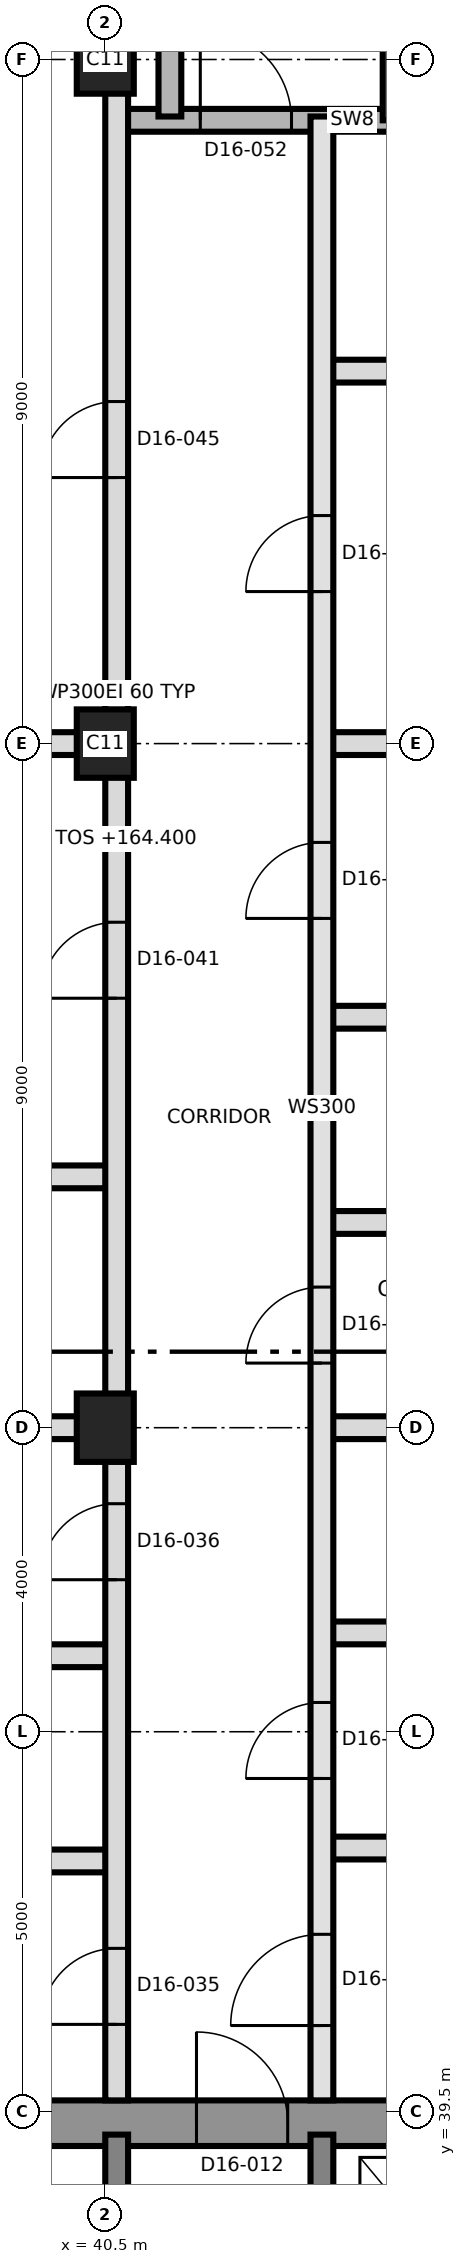
"""IFC4 building model, lengths in metres.
Left out: names, types, materials, properties, quantities, classifications, styles, units other than length and angle.
Written with IfcOpenShell. Run it as: python <this file> out.ifc"""

import sys

from ifc_helpers import new_model, si_unit, direction, frame, frame_2d, origin, origin_2d, place, context, subcontext, project, spatial, rectangle, extrude, element, fill, save


model = new_model("IFC4")
c1 = context("Model", 3, precision=1e-05, world=origin(), true_north=direction((0.0, 1.0)))
c2 = subcontext(c1, "Body", "Model", "MODEL_VIEW")
j1 = project(units=[si_unit("LENGTHUNIT", "METRE"), si_unit("PLANEANGLEUNIT", "RADIAN")], contexts=[c1])
p1 = place(None, origin())
s1 = spatial("IfcSite", under=j1, at=p1, CompositionType="ELEMENT")
p2 = place(p1, origin())
s2 = spatial("IfcBuilding", under=s1, at=p2, CompositionType="ELEMENT")
p3 = place(p2, frame((0.0, 0.0, 164.4)))
s3 = spatial("IfcBuildingStorey", under=s2, at=p3, CompositionType="ELEMENT", Elevation=164.4)
p4 = place(p3, frame((31.2, 39.35, 0.0), z_axis=(0.0, 0.0, 1.0), x_axis=(1.0, 0.0, 0.0)))
e1 = element("IfcWall", 1, at=p4, inside=s3, PredefinedType="SHEAR", context=c2, shape_type="SweptSolid", body=[
    extrude(rectangle(XDim=27.0, YDim=0.6, at=frame_2d((13.5, 0.0))), origin(), (0.0, 0.0, 1.0), 3.7),
])
p5 = place(p4, frame((10.5, 0.0, 0.0)))
e2 = element("IfcOpeningElement", 2, at=p5, cuts=e1, PredefinedType="OPENING", context=c2, shape_type="SweptSolid", body=[
    extrude(rectangle(XDim=1.2, YDim=2.1, at=frame_2d((0.6, 1.05))), frame((0.0, 0.31, 0.0), z_axis=(0.0, -1.0, 0.0), x_axis=(1.0, 0.0, 0.0)), (0.0, 0.0, 1.0), 0.62),
])
for number, where, z_axis, x_axis in (
    (3, (40.65, 33.5, 0.0), (0.0, 0.0, 1.0), (0.0, 1.0, 0.0)),
    (4, (43.35, 33.5, 0.0), (0.0, 0.0, 1.0), (0.0, 1.0, 0.0)),
):
    element("IfcWall", number, at=place(p3, frame(where, z_axis=z_axis, x_axis=x_axis)), inside=s3, PredefinedType="SHEAR", context=c2, shape_type="SweptSolid", body=[
        extrude(rectangle(XDim=5.7, YDim=0.3, at=frame_2d((2.85, 0.0))), origin(), (0.0, 0.0, 1.0), 3.7),
    ])
for number, where, z_axis, x_axis in (
    (5, (40.5, 48.5, 0.0), (0.0, 0.0, 1.0), (0.0, 1.0, 0.0)),
    (6, (40.5, 57.5, 0.0), (0.0, 0.0, 1.0), (0.0, 1.0, 0.0)),
    (7, (40.5, 66.5, 0.0), (0.0, 0.0, 1.0), (0.0, 1.0, 0.0)),
):
    element("IfcColumn", number, at=place(p3, frame(where, z_axis=z_axis, x_axis=x_axis)), inside=s3, PredefinedType="COLUMN", context=c2, shape_type="SweptSolid", body=[
        extrude(rectangle(XDim=0.9, YDim=0.75, at=origin_2d()), origin(), (0.0, 0.0, 1.0), 3.7),
    ])
p6 = place(p3, frame((37.45, 42.8, 0.0), z_axis=(0.0, 0.0, 1.0), x_axis=(1.0, 0.0, 0.0)))
e8 = element("IfcWall", 8, at=p6, inside=s3, PredefinedType="PARTITIONING", context=c2, shape_type="SweptSolid", body=[
    extrude(rectangle(XDim=3.2, YDim=0.3, at=frame_2d((1.6, 0.0))), origin(), (0.0, 0.0, 1.0), 3.4),
])
p7 = place(p3, frame((43.35, 42.97, 0.0), z_axis=(0.0, 0.0, 1.0), x_axis=(1.0, 0.0, 0.0)))
e9 = element("IfcWall", 9, at=p7, inside=s3, PredefinedType="PARTITIONING", context=c2, shape_type="SweptSolid", body=[
    extrude(rectangle(XDim=8.149, YDim=0.3, at=frame_2d((4.074, 0.0))), origin(), (0.0, 0.0, 1.0), 3.4),
])
p8 = place(p3, frame((30.565, 45.5, 0.0), z_axis=(0.0, 0.0, 1.0), x_axis=(1.0, 0.0, 0.0)))
e10 = element("IfcWall", 10, at=p8, inside=s3, PredefinedType="PARTITIONING", context=c2, shape_type="SweptSolid", body=[
    extrude(rectangle(XDim=10.085, YDim=0.3, at=frame_2d((5.042, 0.0))), origin(), (0.0, 0.0, 1.0), 3.4),
])
p9 = place(p3, frame((43.35, 45.8, 0.0), z_axis=(0.0, 0.0, 1.0), x_axis=(1.0, 0.0, 0.0)))
e11 = element("IfcWall", 11, at=p9, inside=s3, PredefinedType="PARTITIONING", context=c2, shape_type="SweptSolid", body=[
    extrude(rectangle(XDim=3.2, YDim=0.3, at=frame_2d((1.6, 0.0))), origin(), (0.0, 0.0, 1.0), 3.4),
])
p10 = place(p3, frame((30.565, 48.5, 0.0), z_axis=(0.0, 0.0, 1.0), x_axis=(1.0, 0.0, 0.0)))
e12 = element("IfcWall", 12, at=p10, inside=s3, PredefinedType="PARTITIONING", context=c2, shape_type="SweptSolid", body=[
    extrude(rectangle(XDim=10.085, YDim=0.3, at=frame_2d((5.042, 0.0))), origin(), (0.0, 0.0, 1.0), 3.4),
])
p11 = place(p3, frame((43.35, 48.5, 0.0), z_axis=(0.0, 0.0, 1.0), x_axis=(1.0, 0.0, 0.0)))
e13 = element("IfcWall", 13, at=p11, inside=s3, PredefinedType="PARTITIONING", context=c2, shape_type="SweptSolid", body=[
    extrude(rectangle(XDim=7.265, YDim=0.3, at=frame_2d((3.632, 0.0))), origin(), (0.0, 0.0, 1.0), 3.4),
])
p12 = place(p3, frame((43.35, 51.2, 0.0), z_axis=(0.0, 0.0, 1.0), x_axis=(1.0, 0.0, 0.0)))
e14 = element("IfcWall", 14, at=p12, inside=s3, PredefinedType="PARTITIONING", context=c2, shape_type="SweptSolid", body=[
    extrude(rectangle(XDim=3.2, YDim=0.3, at=frame_2d((1.6, 0.0))), origin(), (0.0, 0.0, 1.0), 3.4),
])
p13 = place(p3, frame((37.15, 51.8, 0.0), z_axis=(0.0, 0.0, 1.0), x_axis=(1.0, 0.0, 0.0)))
e15 = element("IfcWall", 15, at=p13, inside=s3, PredefinedType="PARTITIONING", context=c2, shape_type="SweptSolid", body=[
    extrude(rectangle(XDim=3.5, YDim=0.3, at=frame_2d((1.75, 0.0))), origin(), (0.0, 0.0, 1.0), 3.4),
])
p14 = place(p3, frame((43.35, 53.9, 0.0), z_axis=(0.0, 0.0, 1.0), x_axis=(1.0, 0.0, 0.0)))
e16 = element("IfcWall", 16, at=p14, inside=s3, PredefinedType="PARTITIONING", context=c2, shape_type="SweptSolid", body=[
    extrude(rectangle(XDim=7.225, YDim=0.3, at=frame_2d((3.612, 0.0))), origin(), (0.0, 0.0, 1.0), 3.4),
])
p15 = place(p3, frame((30.565, 57.5, 0.0), z_axis=(0.0, 0.0, 1.0), x_axis=(1.0, 0.0, 0.0)))
e17 = element("IfcWall", 17, at=p15, inside=s3, PredefinedType="PARTITIONING", context=c2, shape_type="SweptSolid", body=[
    extrude(rectangle(XDim=10.085, YDim=0.3, at=frame_2d((5.042, 0.0))), origin(), (0.0, 0.0, 1.0), 3.4),
])
p16 = place(p3, frame((43.35, 57.5, 0.0), z_axis=(0.0, 0.0, 1.0), x_axis=(1.0, 0.0, 0.0)))
e18 = element("IfcWall", 18, at=p16, inside=s3, PredefinedType="PARTITIONING", context=c2, shape_type="SweptSolid", body=[
    extrude(rectangle(XDim=7.265, YDim=0.3, at=frame_2d((3.632, 0.0))), origin(), (0.0, 0.0, 1.0), 3.4),
])
p17 = place(p3, frame((43.35, 62.4, 0.0), z_axis=(0.0, 0.0, 1.0), x_axis=(1.0, 0.0, 0.0)))
e19 = element("IfcWall", 19, at=p17, inside=s3, PredefinedType="PARTITIONING", context=c2, shape_type="SweptSolid", body=[
    extrude(rectangle(XDim=7.265, YDim=0.3, at=frame_2d((3.632, 0.0))), origin(), (0.0, 0.0, 1.0), 3.4),
])
p18 = place(p17, frame((4.65, 0.0, 0.0)))
e20 = element("IfcOpeningElement", 20, at=p18, cuts=e19, PredefinedType="OPENING", context=c2, shape_type="SweptSolid", body=[
    extrude(rectangle(XDim=1.0, YDim=2.1, at=frame_2d((0.5, 1.05))), frame((0.0, 0.16, 0.0), z_axis=(0.0, -1.0, 0.0), x_axis=(1.0, 0.0, 0.0)), (0.0, 0.0, 1.0), 0.32),
])
p19 = place(p3, frame((40.65, 65.7, 0.0), z_axis=(0.0, 0.0, 1.0), x_axis=(1.0, 0.0, 0.0)))
e21 = element("IfcWall", 21, at=p19, inside=s3, PredefinedType="SHEAR", context=c2, shape_type="SweptSolid", body=[
    extrude(rectangle(XDim=6.2, YDim=0.3, at=frame_2d((3.1, 0.0))), origin(), (0.0, 0.0, 1.0), 3.4),
])
p20 = place(p19, frame((1.1, 0.0, 0.0)))
e22 = element("IfcOpeningElement", 22, at=p20, cuts=e21, PredefinedType="OPENING", context=c2, shape_type="SweptSolid", body=[
    extrude(rectangle(XDim=1.2, YDim=2.1, at=frame_2d((0.6, 1.05))), frame((0.0, 0.16, 0.0), z_axis=(0.0, -1.0, 0.0), x_axis=(1.0, 0.0, 0.0)), (0.0, 0.0, 1.0), 0.32),
])
p21 = place(p3, frame((40.65, 39.65, 0.0), z_axis=(0.0, 0.0, 1.0), x_axis=(0.0, 1.0, 0.0)))
e23 = element("IfcWall", 23, at=p21, inside=s3, PredefinedType="PARTITIONING", context=c2, shape_type="SweptSolid", body=[
    extrude(rectangle(XDim=37.025, YDim=0.3, at=frame_2d((18.513, 0.0))), origin(), (0.0, 0.0, 1.0), 3.4),
])
p22 = place(p21, frame((1.0, 0.0, 0.0)))
e24 = element("IfcOpeningElement", 24, at=p22, cuts=e23, PredefinedType="OPENING", context=c2, shape_type="SweptSolid", body=[
    extrude(rectangle(XDim=1.0, YDim=2.1, at=frame_2d((0.5, 1.05))), frame((0.0, 0.16, 0.0), z_axis=(0.0, -1.0, 0.0), x_axis=(1.0, 0.0, 0.0)), (0.0, 0.0, 1.0), 0.32),
])
p23 = place(p21, frame((6.85, 0.0, 0.0)))
e25 = element("IfcOpeningElement", 25, at=p23, cuts=e23, PredefinedType="OPENING", context=c2, shape_type="SweptSolid", body=[
    extrude(rectangle(XDim=1.0, YDim=2.1, at=frame_2d((0.5, 1.05))), frame((0.0, 0.16, 0.0), z_axis=(0.0, -1.0, 0.0), x_axis=(1.0, 0.0, 0.0)), (0.0, 0.0, 1.0), 0.32),
])
p24 = place(p21, frame((14.5, 0.0, 0.0)))
e26 = element("IfcOpeningElement", 26, at=p24, cuts=e23, PredefinedType="OPENING", context=c2, shape_type="SweptSolid", body=[
    extrude(rectangle(XDim=1.0, YDim=2.4, at=frame_2d((0.5, 1.2))), frame((0.0, 0.16, 0.0), z_axis=(0.0, -1.0, 0.0), x_axis=(1.0, 0.0, 0.0)), (0.0, 0.0, 1.0), 0.32),
])
p25 = place(p21, frame((21.35, 0.0, 0.0)))
e27 = element("IfcOpeningElement", 27, at=p25, cuts=e23, PredefinedType="OPENING", context=c2, shape_type="SweptSolid", body=[
    extrude(rectangle(XDim=1.0, YDim=2.4, at=frame_2d((0.5, 1.2))), frame((0.0, 0.16, 0.0), z_axis=(0.0, -1.0, 0.0), x_axis=(1.0, 0.0, 0.0)), (0.0, 0.0, 1.0), 0.32),
])
p26 = place(p3, frame((41.35, 65.75, 0.0), z_axis=(0.0, 0.0, 1.0), x_axis=(0.0, 1.0, 0.0)))
e28 = element("IfcWall", 28, at=p26, inside=s3, PredefinedType="SHEAR", context=c2, shape_type="SweptSolid", body=[
    extrude(rectangle(XDim=8.85, YDim=0.3, at=frame_2d((4.425, 0.0))), origin(), (0.0, 0.0, 1.0), 3.4),
])
p27 = place(p3, frame((43.35, 39.65, 0.0), z_axis=(0.0, 0.0, 1.0), x_axis=(0.0, 1.0, 0.0)))
e29 = element("IfcWall", 29, at=p27, inside=s3, PredefinedType="SOLIDWALL", context=c2, shape_type="SweptSolid", body=[
    extrude(rectangle(XDim=26.1, YDim=0.3, at=frame_2d((13.05, 0.0))), origin(), (0.0, 0.0, 1.0), 3.4),
])
p28 = place(p27, frame((0.985, 0.0, 0.0)))
e30 = element("IfcOpeningElement", 30, at=p28, cuts=e29, PredefinedType="OPENING", context=c2, shape_type="SweptSolid", body=[
    extrude(rectangle(XDim=1.2, YDim=2.1, at=frame_2d((0.6, 1.05))), frame((0.0, 0.16, 0.0), z_axis=(0.0, -1.0, 0.0), x_axis=(1.0, 0.0, 0.0)), (0.0, 0.0, 1.0), 0.32),
])
p29 = place(p27, frame((4.235, 0.0, 0.0)))
e31 = element("IfcOpeningElement", 31, at=p29, cuts=e29, PredefinedType="OPENING", context=c2, shape_type="SweptSolid", body=[
    extrude(rectangle(XDim=1.0, YDim=2.1, at=frame_2d((0.5, 1.05))), frame((0.0, 0.16, 0.0), z_axis=(0.0, -1.0, 0.0), x_axis=(1.0, 0.0, 0.0)), (0.0, 0.0, 1.0), 0.32),
])
p30 = place(p27, frame((9.7, 0.0, 0.0)))
e32 = element("IfcOpeningElement", 32, at=p30, cuts=e29, PredefinedType="OPENING", context=c2, shape_type="SweptSolid", body=[
    extrude(rectangle(XDim=1.0, YDim=2.1, at=frame_2d((0.5, 1.05))), frame((0.0, 0.16, 0.0), z_axis=(0.0, -1.0, 0.0), x_axis=(1.0, 0.0, 0.0)), (0.0, 0.0, 1.0), 0.32),
])
p31 = place(p27, frame((15.55, 0.0, 0.0)))
e33 = element("IfcOpeningElement", 33, at=p31, cuts=e29, PredefinedType="OPENING", context=c2, shape_type="SweptSolid", body=[
    extrude(rectangle(XDim=1.0, YDim=2.1, at=frame_2d((0.5, 1.05))), frame((0.0, 0.16, 0.0), z_axis=(0.0, -1.0, 0.0), x_axis=(1.0, 0.0, 0.0)), (0.0, 0.0, 1.0), 0.32),
])
p32 = place(p27, frame((19.85, 0.0, 0.0)))
e34 = element("IfcOpeningElement", 34, at=p32, cuts=e29, PredefinedType="OPENING", context=c2, shape_type="SweptSolid", body=[
    extrude(rectangle(XDim=1.0, YDim=2.4, at=frame_2d((0.5, 1.2))), frame((0.0, 0.16, 0.0), z_axis=(0.0, -1.0, 0.0), x_axis=(1.0, 0.0, 0.0)), (0.0, 0.0, 1.0), 0.32),
])
p33 = place(p3, frame((44.3, 65.7, 0.0), z_axis=(0.0, 0.0, 1.0), x_axis=(0.0, 1.0, 0.0)))
e35 = element("IfcWall", 35, at=p33, inside=s3, PredefinedType="SHEAR", context=c2, shape_type="SweptSolid", body=[
    extrude(rectangle(XDim=8.9, YDim=0.3, at=frame_2d((4.45, 0.0))), origin(), (0.0, 0.0, 1.0), 3.4),
])
p34 = place(p5, origin())
e36 = element("IfcDoor", 36, at=p34, inside=s3, OperationType="SINGLE_SWING_RIGHT", PredefinedType="DOOR", context=c2, shape_type="SweptSolid", body=[
    extrude(rectangle(XDim=1.2, YDim=2.1, at=frame_2d((0.6, 1.05))), frame((0.0, 0.025, 0.0), z_axis=(0.0, -1.0, 0.0), x_axis=(1.0, 0.0, 0.0)), (0.0, 0.0, 1.0), 0.05),
])
fill(e2, e36)
p35 = place(p28, origin())
e37 = element("IfcDoor", 37, at=p35, inside=s3, OperationType="SINGLE_SWING_RIGHT", PredefinedType="DOOR", context=c2, shape_type="SweptSolid", body=[
    extrude(rectangle(XDim=1.2, YDim=2.1, at=frame_2d((0.6, 1.05))), frame((0.0, 0.025, 0.0), z_axis=(0.0, -1.0, 0.0), x_axis=(1.0, 0.0, 0.0)), (0.0, 0.0, 1.0), 0.05),
])
fill(e30, e37)
p36 = place(p29, origin())
e38 = element("IfcDoor", 38, at=p36, inside=s3, OperationType="SINGLE_SWING_LEFT", PredefinedType="DOOR", context=c2, shape_type="SweptSolid", body=[
    extrude(rectangle(XDim=1.0, YDim=2.1, at=frame_2d((0.5, 1.05))), frame((0.0, 0.025, 0.0), z_axis=(0.0, -1.0, 0.0), x_axis=(1.0, 0.0, 0.0)), (0.0, 0.0, 1.0), 0.05),
])
fill(e31, e38)
p37 = place(p22, origin())
e39 = element("IfcDoor", 39, at=p37, inside=s3, OperationType="SINGLE_SWING_RIGHT", PredefinedType="DOOR", context=c2, shape_type="SweptSolid", body=[
    extrude(rectangle(XDim=1.0, YDim=2.1, at=frame_2d((0.5, 1.05))), frame((0.0, 0.025, 0.0), z_axis=(0.0, -1.0, 0.0), x_axis=(1.0, 0.0, 0.0)), (0.0, 0.0, 1.0), 0.05),
])
fill(e24, e39)
p38 = place(p23, origin())
e40 = element("IfcDoor", 40, at=p38, inside=s3, OperationType="SINGLE_SWING_LEFT", PredefinedType="DOOR", context=c2, shape_type="SweptSolid", body=[
    extrude(rectangle(XDim=1.0, YDim=2.1, at=frame_2d((0.5, 1.05))), frame((0.0, 0.025, 0.0), z_axis=(0.0, -1.0, 0.0), x_axis=(1.0, 0.0, 0.0)), (0.0, 0.0, 1.0), 0.05),
])
fill(e25, e40)
p39 = place(p30, origin())
e41 = element("IfcDoor", 41, at=p39, inside=s3, OperationType="SINGLE_SWING_RIGHT", PredefinedType="DOOR", context=c2, shape_type="SweptSolid", body=[
    extrude(rectangle(XDim=1.0, YDim=2.1, at=frame_2d((0.5, 1.05))), frame((0.0, 0.025, 0.0), z_axis=(0.0, -1.0, 0.0), x_axis=(1.0, 0.0, 0.0)), (0.0, 0.0, 1.0), 0.05),
])
fill(e32, e41)
p40 = place(p31, origin())
e42 = element("IfcDoor", 42, at=p40, inside=s3, OperationType="SINGLE_SWING_LEFT", PredefinedType="DOOR", context=c2, shape_type="SweptSolid", body=[
    extrude(rectangle(XDim=1.0, YDim=2.1, at=frame_2d((0.5, 1.05))), frame((0.0, 0.025, 0.0), z_axis=(0.0, -1.0, 0.0), x_axis=(1.0, 0.0, 0.0)), (0.0, 0.0, 1.0), 0.05),
])
fill(e33, e42)
p41 = place(p24, origin())
e43 = element("IfcDoor", 43, at=p41, inside=s3, OperationType="SINGLE_SWING_RIGHT", PredefinedType="DOOR", context=c2, shape_type="SweptSolid", body=[
    extrude(rectangle(XDim=1.0, YDim=2.4, at=frame_2d((0.5, 1.2))), frame((0.0, 0.025, 0.0), z_axis=(0.0, -1.0, 0.0), x_axis=(1.0, 0.0, 0.0)), (0.0, 0.0, 1.0), 0.05),
])
fill(e26, e43)
p42 = place(p32, origin())
e44 = element("IfcDoor", 44, at=p42, inside=s3, OperationType="SINGLE_SWING_LEFT", PredefinedType="DOOR", context=c2, shape_type="SweptSolid", body=[
    extrude(rectangle(XDim=1.0, YDim=2.4, at=frame_2d((0.5, 1.2))), frame((0.0, 0.025, 0.0), z_axis=(0.0, -1.0, 0.0), x_axis=(1.0, 0.0, 0.0)), (0.0, 0.0, 1.0), 0.05),
])
fill(e34, e44)
p43 = place(p25, origin())
e45 = element("IfcDoor", 45, at=p43, inside=s3, OperationType="SINGLE_SWING_LEFT", PredefinedType="DOOR", context=c2, shape_type="SweptSolid", body=[
    extrude(rectangle(XDim=1.0, YDim=2.4, at=frame_2d((0.5, 1.2))), frame((0.0, 0.025, 0.0), z_axis=(0.0, -1.0, 0.0), x_axis=(1.0, 0.0, 0.0)), (0.0, 0.0, 1.0), 0.05),
])
fill(e27, e45)
p44 = place(p20, origin())
e46 = element("IfcDoor", 46, at=p44, inside=s3, OperationType="SINGLE_SWING_RIGHT", PredefinedType="DOOR", context=c2, shape_type="SweptSolid", body=[
    extrude(rectangle(XDim=1.2, YDim=2.1, at=frame_2d((0.6, 1.05))), frame((0.0, 0.025, 0.0), z_axis=(0.0, -1.0, 0.0), x_axis=(1.0, 0.0, 0.0)), (0.0, 0.0, 1.0), 0.05),
])
fill(e22, e46)
save(model, sys.argv[1])
